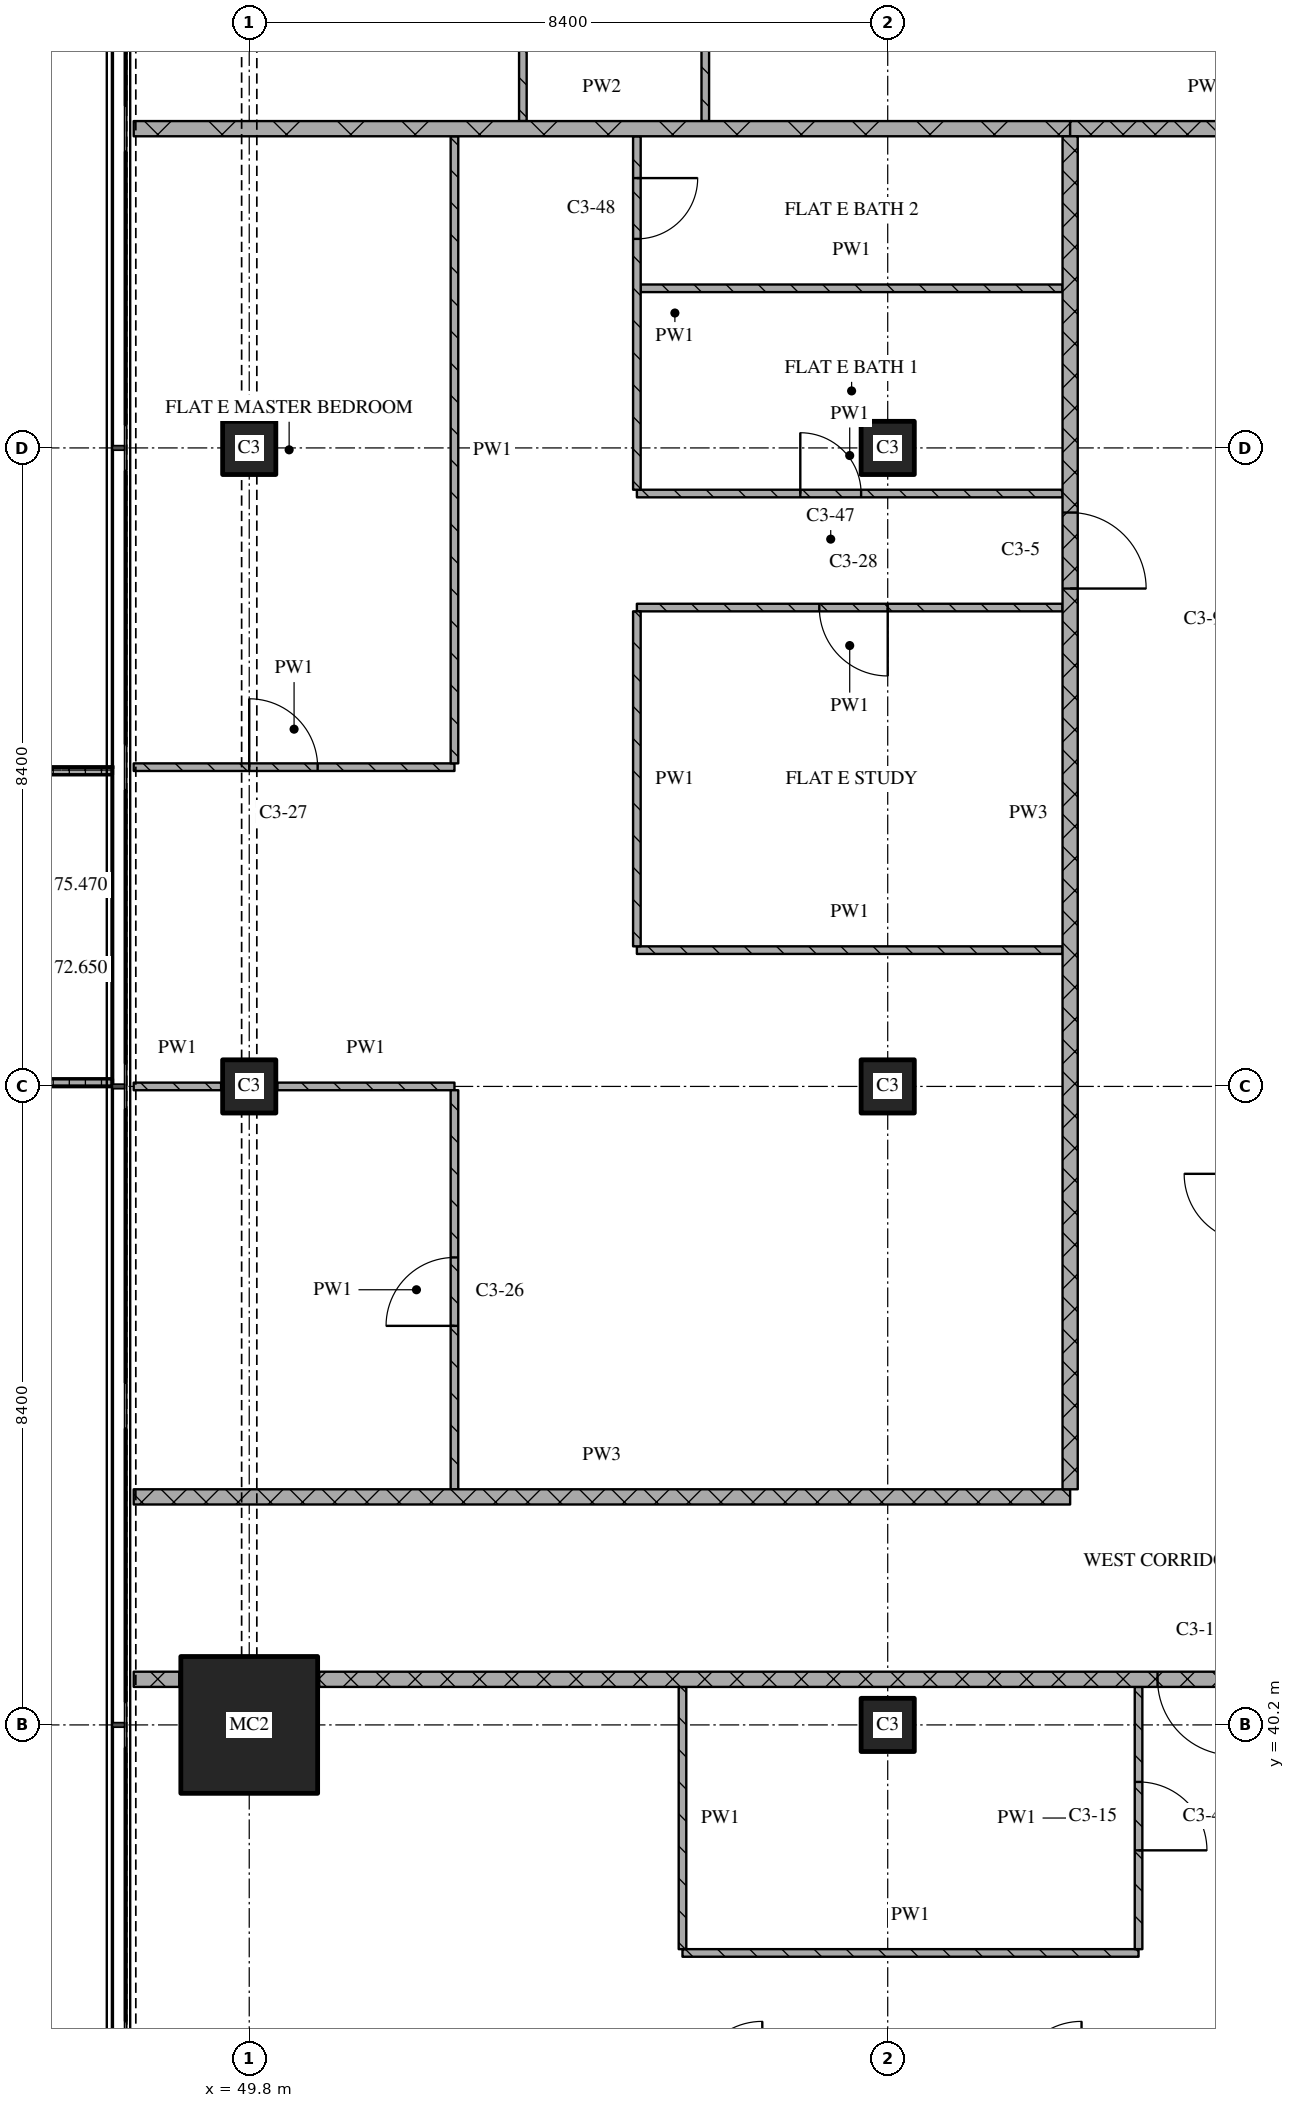
"""IFC4 building model, lengths in metres.
Left out: names, types, materials, properties, quantities, classifications, styles, units other than length and angle.
Written with IfcOpenShell. Run it as: python <this file> out.ifc"""

import sys

from ifc_helpers import new_model, si_unit, direction, frame, frame_2d, origin, origin_2d, place, context, subcontext, project, spatial, polyline, rectangle, outline, extrude, element, fill, save


model = new_model("IFC4")
c1 = context("Model", 3, precision=1e-05, world=origin(), true_north=direction((0.0, 1.0)))
c2 = subcontext(c1, "Body", "Model", "MODEL_VIEW")
j1 = project(units=[si_unit("LENGTHUNIT", "METRE"), si_unit("PLANEANGLEUNIT", "RADIAN")], contexts=[c1])
p1 = place(None, origin())
s1 = spatial("IfcSite", under=j1, at=p1, CompositionType="ELEMENT")
p2 = place(p1, origin())
s2 = spatial("IfcBuilding", under=s1, at=p2, CompositionType="ELEMENT")
p3 = place(p2, frame((0.0, 0.0, 172.65)))
s3 = spatial("IfcBuildingStorey", under=s2, at=p3, CompositionType="ELEMENT", Elevation=172.65)
p4 = place(p3, frame((49.8, 40.2, 0.0), z_axis=(0.0, 0.0, 1.0), x_axis=(1.0, 0.0, 0.0)))
e1 = element("IfcColumn", 1, at=p4, inside=s3, PredefinedType="COLUMN", context=c2, shape_type="SweptSolid", body=[
    extrude(rectangle(XDim=1.8, YDim=1.8, at=origin_2d()), origin(), (0.0, 0.0, 1.0), 3.6),
])
for number, where, z_axis, x_axis in (
    (2, (49.8, 48.6, 0.0), (0.0, 0.0, 1.0), (1.0, 0.0, 0.0)),
    (3, (49.8, 57.0, 0.0), (0.0, 0.0, 1.0), (1.0, 0.0, 0.0)),
    (4, (58.2, 40.2, 0.0), (0.0, 0.0, 1.0), (1.0, 0.0, 0.0)),
    (5, (58.2, 48.6, 0.0), (0.0, 0.0, 1.0), (1.0, 0.0, 0.0)),
    (6, (58.2, 57.0, 0.0), (0.0, 0.0, 1.0), (1.0, 0.0, 0.0)),
):
    element("IfcColumn", number, at=place(p3, frame(where, z_axis=z_axis, x_axis=x_axis)), inside=s3, PredefinedType="COLUMN", context=c2, shape_type="SweptSolid", body=[
        extrude(rectangle(XDim=0.7, YDim=0.7, at=origin_2d()), origin(), (0.0, 0.0, 1.0), 3.6),
    ])
p5 = place(p3, origin())
e7 = element("IfcWall", 7, at=p5, inside=s3, PredefinedType="SOLIDWALL", context=c2, shape_type="SweptSolid", body=[
    extrude(outline(polyline([(48.0, 52.8), (48.0, 52.7), (46.367, 52.7), (46.367, 48.7), (48.0, 48.7), (48.0, 48.6), (46.267, 48.6), (46.267, 52.8), (48.0, 52.8)])), origin(), (0.0, 0.0, 1.0), 1.0),
])
p6 = place(p3, frame((55.5, 37.2, 0.0), z_axis=(0.0, 0.0, 1.0), x_axis=(1.0, 0.0, 0.0)))
e8 = element("IfcWall", 8, at=p6, inside=s3, PredefinedType="PARTITIONING", context=c2, shape_type="SweptSolid", body=[
    extrude(rectangle(XDim=6.0, YDim=0.1, at=frame_2d((3.0, 0.0))), origin(), (0.0, 0.0, 1.0), 3.32),
])
p7 = place(p3, frame((48.28, 40.8, 0.0), z_axis=(0.0, 0.0, 1.0), x_axis=(1.0, 0.0, 0.0)))
e9 = element("IfcWall", 9, at=p7, inside=s3, PredefinedType="PARTITIONING", context=c2, shape_type="SweptSolid", body=[
    extrude(rectangle(XDim=0.6, YDim=0.2, at=frame_2d((0.3, 0.0))), origin(), (0.0, 0.0, 1.0), 3.32),
])
p8 = place(p3, frame((75.0, 40.8, 0.0), z_axis=(0.0, 0.0, 1.0), x_axis=(-1.0, 0.0, 0.0)))
e10 = element("IfcWall", 10, at=p8, inside=s3, PredefinedType="PARTITIONING", context=c2, shape_type="SweptSolid", body=[
    extrude(rectangle(XDim=24.28, YDim=0.2, at=frame_2d((12.14, 0.0))), origin(), (0.0, 0.0, 1.0), 3.32),
])
p9 = place(p8, frame((12.25, 0.0, 0.0)))
e11 = element("IfcOpeningElement", 11, at=p9, cuts=e10, PredefinedType="OPENING", context=c2, shape_type="SweptSolid", body=[
    extrude(rectangle(XDim=1.0, YDim=2.1, at=frame_2d((0.5, 1.05))), frame((0.0, 0.11, 0.0), z_axis=(0.0, -1.0, 0.0), x_axis=(1.0, 0.0, 0.0)), (0.0, 0.0, 1.0), 0.22),
])
p10 = place(p3, frame((48.28, 43.2, 0.0), z_axis=(0.0, 0.0, 1.0), x_axis=(1.0, 0.0, 0.0)))
e12 = element("IfcWall", 12, at=p10, inside=s3, PredefinedType="PARTITIONING", context=c2, shape_type="SweptSolid", body=[
    extrude(rectangle(XDim=12.32, YDim=0.2, at=frame_2d((6.16, 0.0))), origin(), (0.0, 0.0, 1.0), 3.32),
])
p11 = place(p3, frame((48.28, 48.6, 0.0), z_axis=(0.0, 0.0, 1.0), x_axis=(1.0, 0.0, 0.0)))
e13 = element("IfcWall", 13, at=p11, inside=s3, PredefinedType="PARTITIONING", context=c2, shape_type="SweptSolid", body=[
    extrude(rectangle(XDim=1.15, YDim=0.1, at=frame_2d((0.575, 0.0))), origin(), (0.0, 0.0, 1.0), 3.32),
])
p12 = place(p3, frame((50.17, 48.6, 0.0), z_axis=(0.0, 0.0, 1.0), x_axis=(1.0, 0.0, 0.0)))
e14 = element("IfcWall", 14, at=p12, inside=s3, PredefinedType="PARTITIONING", context=c2, shape_type="SweptSolid", body=[
    extrude(rectangle(XDim=2.33, YDim=0.1, at=frame_2d((1.165, 0.0))), origin(), (0.0, 0.0, 1.0), 3.32),
])
p13 = place(p3, frame((54.9, 50.393, 0.0), z_axis=(0.0, 0.0, 1.0), x_axis=(1.0, 0.0, 0.0)))
e15 = element("IfcWall", 15, at=p13, inside=s3, PredefinedType="PARTITIONING", context=c2, shape_type="SweptSolid", body=[
    extrude(rectangle(XDim=5.6, YDim=0.1, at=frame_2d((2.8, 0.0))), origin(), (0.0, 0.0, 1.0), 3.32),
])
p14 = place(p3, frame((48.28, 52.8, 0.0), z_axis=(0.0, 0.0, 1.0), x_axis=(1.0, 0.0, 0.0)))
e16 = element("IfcWall", 16, at=p14, inside=s3, PredefinedType="PARTITIONING", context=c2, shape_type="SweptSolid", body=[
    extrude(rectangle(XDim=4.22, YDim=0.1, at=frame_2d((2.11, 0.0))), origin(), (0.0, 0.0, 1.0), 3.32),
])
p15 = place(p14, frame((1.52, 0.0, 0.0)))
e17 = element("IfcOpeningElement", 17, at=p15, cuts=e16, PredefinedType="OPENING", context=c2, shape_type="SweptSolid", body=[
    extrude(rectangle(XDim=0.9, YDim=2.1, at=frame_2d((0.45, 1.05))), frame((0.0, 0.06, 0.0), z_axis=(0.0, -1.0, 0.0), x_axis=(1.0, 0.0, 0.0)), (0.0, 0.0, 1.0), 0.12),
])
p16 = place(p3, frame((60.5, 54.9, 0.0), z_axis=(0.0, 0.0, 1.0), x_axis=(-1.0, 0.0, 0.0)))
e18 = element("IfcWall", 18, at=p16, inside=s3, PredefinedType="PARTITIONING", context=c2, shape_type="SweptSolid", body=[
    extrude(rectangle(XDim=5.6, YDim=0.1, at=frame_2d((2.8, 0.0))), origin(), (0.0, 0.0, 1.0), 3.32),
])
p17 = place(p16, frame((2.3, 0.0, 0.0)))
e19 = element("IfcOpeningElement", 19, at=p17, cuts=e18, PredefinedType="OPENING", context=c2, shape_type="SweptSolid", body=[
    extrude(rectangle(XDim=0.9, YDim=2.1, at=frame_2d((0.45, 1.05))), frame((0.0, 0.06, 0.0), z_axis=(0.0, -1.0, 0.0), x_axis=(1.0, 0.0, 0.0)), (0.0, 0.0, 1.0), 0.12),
])
p18 = place(p3, frame((54.9, 56.4, 0.0), z_axis=(0.0, 0.0, 1.0), x_axis=(1.0, 0.0, 0.0)))
e20 = element("IfcWall", 20, at=p18, inside=s3, PredefinedType="PARTITIONING", context=c2, shape_type="SweptSolid", body=[
    extrude(rectangle(XDim=5.6, YDim=0.1, at=frame_2d((2.8, 0.0))), origin(), (0.0, 0.0, 1.0), 3.32),
])
p19 = place(p18, frame((2.15, 0.0, 0.0)))
e21 = element("IfcOpeningElement", 21, at=p19, cuts=e20, PredefinedType="OPENING", context=c2, shape_type="SweptSolid", body=[
    extrude(rectangle(XDim=0.8, YDim=2.1, at=frame_2d((0.4, 1.05))), frame((0.0, 0.06, 0.0), z_axis=(0.0, -1.0, 0.0), x_axis=(1.0, 0.0, 0.0)), (0.0, 0.0, 1.0), 0.12),
])
p20 = place(p3, frame((54.95, 59.1, 0.0), z_axis=(0.0, 0.0, 1.0), x_axis=(1.0, 0.0, 0.0)))
e22 = element("IfcWall", 22, at=p20, inside=s3, PredefinedType="PARTITIONING", context=c2, shape_type="SweptSolid", body=[
    extrude(rectangle(XDim=5.55, YDim=0.1, at=frame_2d((2.775, 0.0))), origin(), (0.0, 0.0, 1.0), 3.32),
])
p21 = place(p3, frame((60.6, 61.2, 0.0), z_axis=(0.0, 0.0, 1.0), x_axis=(1.0, 0.0, 0.0)))
e23 = element("IfcWall", 23, at=p21, inside=s3, PredefinedType="PARTITIONING", context=c2, shape_type="SweptSolid", body=[
    extrude(rectangle(XDim=3.6, YDim=0.2, at=frame_2d((1.8, 0.0))), origin(), (0.0, 0.0, 1.0), 3.32),
])
p22 = place(p3, frame((48.28, 61.2, 0.0), z_axis=(0.0, 0.0, 1.0), x_axis=(1.0, 0.0, 0.0)))
e24 = element("IfcWall", 24, at=p22, inside=s3, PredefinedType="PARTITIONING", context=c2, shape_type="SweptSolid", body=[
    extrude(rectangle(XDim=12.32, YDim=0.2, at=frame_2d((6.16, 0.0))), origin(), (0.0, 0.0, 1.0), 3.32),
])
p23 = place(p3, frame((52.5, 43.3, 0.0), z_axis=(0.0, 0.0, 1.0), x_axis=(0.0, 1.0, 0.0)))
e25 = element("IfcWall", 25, at=p23, inside=s3, PredefinedType="PARTITIONING", context=c2, shape_type="SweptSolid", body=[
    extrude(rectangle(XDim=5.25, YDim=0.1, at=frame_2d((2.625, 0.0))), origin(), (0.0, 0.0, 1.0), 3.32),
])
p24 = place(p23, frame((2.15, 0.0, 0.0)))
e26 = element("IfcOpeningElement", 26, at=p24, cuts=e25, PredefinedType="OPENING", context=c2, shape_type="SweptSolid", body=[
    extrude(rectangle(XDim=0.9, YDim=2.1, at=frame_2d((0.45, 1.05))), frame((0.0, 0.06, 0.0), z_axis=(0.0, -1.0, 0.0), x_axis=(1.0, 0.0, 0.0)), (0.0, 0.0, 1.0), 0.12),
])
for number, where, z_axis, x_axis in (
    (27, (52.5, 61.1, 0.0), (0.0, 0.0, 1.0), (0.0, -1.0, 0.0)),
    (28, (53.4, 69.55, 0.0), (0.0, 0.0, 1.0), (0.0, -1.0, 0.0)),
):
    element("IfcWall", number, at=place(p3, frame(where, z_axis=z_axis, x_axis=x_axis)), inside=s3, PredefinedType="PARTITIONING", context=c2, shape_type="SweptSolid", body=[
        extrude(rectangle(XDim=8.25, YDim=0.1, at=frame_2d((4.125, 0.0))), origin(), (0.0, 0.0, 1.0), 3.32),
    ])
p25 = place(p3, frame((54.9, 54.85, 0.0), z_axis=(0.0, 0.0, 1.0), x_axis=(0.0, -1.0, 0.0)))
e29 = element("IfcWall", 29, at=p25, inside=s3, PredefinedType="PARTITIONING", context=c2, shape_type="SweptSolid", body=[
    extrude(rectangle(XDim=4.407, YDim=0.1, at=frame_2d((2.204, 0.0))), origin(), (0.0, 0.0, 1.0), 3.32),
])
p26 = place(p3, frame((54.9, 61.1, 0.0), z_axis=(0.0, 0.0, 1.0), x_axis=(0.0, -1.0, 0.0)))
e30 = element("IfcWall", 30, at=p26, inside=s3, PredefinedType="PARTITIONING", context=c2, shape_type="SweptSolid", body=[
    extrude(rectangle(XDim=4.65, YDim=0.1, at=frame_2d((2.325, 0.0))), origin(), (0.0, 0.0, 1.0), 3.32),
])
p27 = place(p26, frame((0.55, 0.0, 0.0)))
e31 = element("IfcOpeningElement", 31, at=p27, cuts=e30, PredefinedType="OPENING", context=c2, shape_type="SweptSolid", body=[
    extrude(rectangle(XDim=0.8, YDim=2.1, at=frame_2d((0.4, 1.05))), frame((0.0, 0.06, 0.0), z_axis=(0.0, -1.0, 0.0), x_axis=(1.0, 0.0, 0.0)), (0.0, 0.0, 1.0), 0.12),
])
p28 = place(p3, frame((55.5, 40.7, 0.0), z_axis=(0.0, 0.0, 1.0), x_axis=(0.0, -1.0, 0.0)))
e32 = element("IfcWall", 32, at=p28, inside=s3, PredefinedType="PARTITIONING", context=c2, shape_type="SweptSolid", body=[
    extrude(rectangle(XDim=3.45, YDim=0.1, at=frame_2d((1.725, 0.0))), origin(), (0.0, 0.0, 1.0), 3.32),
])
p29 = place(p3, frame((55.8, 65.65, 0.0), z_axis=(0.0, 0.0, 1.0), x_axis=(0.0, -1.0, 0.0)))
e33 = element("IfcWall", 33, at=p29, inside=s3, PredefinedType="PARTITIONING", context=c2, shape_type="SweptSolid", body=[
    extrude(rectangle(XDim=4.35, YDim=0.1, at=frame_2d((2.175, 0.0))), origin(), (0.0, 0.0, 1.0), 3.32),
])
p30 = place(p29, frame((2.473, 0.0, 0.0)))
e34 = element("IfcOpeningElement", 34, at=p30, cuts=e33, PredefinedType="OPENING", context=c2, shape_type="SweptSolid", body=[
    extrude(rectangle(XDim=0.8, YDim=2.1, at=frame_2d((0.4, 1.05))), frame((0.0, 0.06, 0.0), z_axis=(0.0, -1.0, 0.0), x_axis=(1.0, 0.0, 0.0)), (0.0, 0.0, 1.0), 0.12),
])
p31 = place(p3, frame((60.6, 43.3, 0.0), z_axis=(0.0, 0.0, 1.0), x_axis=(0.0, 1.0, 0.0)))
e35 = element("IfcWall", 35, at=p31, inside=s3, PredefinedType="PARTITIONING", context=c2, shape_type="SweptSolid", body=[
    extrude(rectangle(XDim=17.8, YDim=0.2, at=frame_2d((8.9, 0.0))), origin(), (0.0, 0.0, 1.0), 3.32),
])
p32 = place(p31, frame((11.85, 0.0, 0.0)))
e36 = element("IfcOpeningElement", 36, at=p32, cuts=e35, PredefinedType="OPENING", context=c2, shape_type="SweptSolid", body=[
    extrude(rectangle(XDim=1.0, YDim=2.1, at=frame_2d((0.5, 1.05))), frame((0.0, 0.11, 0.0), z_axis=(0.0, -1.0, 0.0), x_axis=(1.0, 0.0, 0.0)), (0.0, 0.0, 1.0), 0.22),
])
p33 = place(p3, frame((61.5, 37.25, 0.0), z_axis=(0.0, 0.0, 1.0), x_axis=(0.0, 1.0, 0.0)))
e37 = element("IfcWall", 37, at=p33, inside=s3, PredefinedType="PARTITIONING", context=c2, shape_type="SweptSolid", body=[
    extrude(rectangle(XDim=3.45, YDim=0.1, at=frame_2d((1.725, 0.0))), origin(), (0.0, 0.0, 1.0), 3.32),
])
p34 = place(p33, frame((1.3, 0.0, 0.0)))
e38 = element("IfcOpeningElement", 38, at=p34, cuts=e37, PredefinedType="OPENING", context=c2, shape_type="SweptSolid", body=[
    extrude(rectangle(XDim=0.9, YDim=2.1, at=frame_2d((0.45, 1.05))), frame((0.0, 0.06, 0.0), z_axis=(0.0, -1.0, 0.0), x_axis=(1.0, 0.0, 0.0)), (0.0, 0.0, 1.0), 0.12),
])
p35 = place(p9, origin())
e39 = element("IfcDoor", 39, at=p35, inside=s3, OperationType="SINGLE_SWING_LEFT", PredefinedType="DOOR", context=c2, shape_type="SweptSolid", body=[
    extrude(rectangle(XDim=1.0, YDim=2.1, at=frame_2d((0.5, 1.05))), frame((0.0, 0.025, 0.0), z_axis=(0.0, -1.0, 0.0), x_axis=(1.0, 0.0, 0.0)), (0.0, 0.0, 1.0), 0.05),
])
fill(e11, e39)
p36 = place(p15, origin())
e40 = element("IfcDoor", 40, at=p36, inside=s3, OperationType="SINGLE_SWING_LEFT", PredefinedType="DOOR", context=c2, shape_type="SweptSolid", body=[
    extrude(rectangle(XDim=0.9, YDim=2.1, at=frame_2d((0.45, 1.05))), frame((0.0, 0.025, 0.0), z_axis=(0.0, -1.0, 0.0), x_axis=(1.0, 0.0, 0.0)), (0.0, 0.0, 1.0), 0.05),
])
fill(e17, e40)
p37 = place(p17, origin())
e41 = element("IfcDoor", 41, at=p37, inside=s3, OperationType="SINGLE_SWING_LEFT", PredefinedType="DOOR", context=c2, shape_type="SweptSolid", body=[
    extrude(rectangle(XDim=0.9, YDim=2.1, at=frame_2d((0.45, 1.05))), frame((0.0, 0.025, 0.0), z_axis=(0.0, -1.0, 0.0), x_axis=(1.0, 0.0, 0.0)), (0.0, 0.0, 1.0), 0.05),
])
fill(e19, e41)
p38 = place(p19, origin())
e42 = element("IfcDoor", 42, at=p38, inside=s3, OperationType="SINGLE_SWING_LEFT", PredefinedType="DOOR", context=c2, shape_type="SweptSolid", body=[
    extrude(rectangle(XDim=0.8, YDim=2.1, at=frame_2d((0.4, 1.05))), frame((0.0, 0.025, 0.0), z_axis=(0.0, -1.0, 0.0), x_axis=(1.0, 0.0, 0.0)), (0.0, 0.0, 1.0), 0.05),
])
fill(e21, e42)
p39 = place(p24, origin())
e43 = element("IfcDoor", 43, at=p39, inside=s3, OperationType="SINGLE_SWING_LEFT", PredefinedType="DOOR", context=c2, shape_type="SweptSolid", body=[
    extrude(rectangle(XDim=0.9, YDim=2.1, at=frame_2d((0.45, 1.05))), frame((0.0, 0.025, 0.0), z_axis=(0.0, -1.0, 0.0), x_axis=(1.0, 0.0, 0.0)), (0.0, 0.0, 1.0), 0.05),
])
fill(e26, e43)
p40 = place(p27, origin())
e44 = element("IfcDoor", 44, at=p40, inside=s3, OperationType="SINGLE_SWING_LEFT", PredefinedType="DOOR", context=c2, shape_type="SweptSolid", body=[
    extrude(rectangle(XDim=0.8, YDim=2.1, at=frame_2d((0.4, 1.05))), frame((0.0, 0.025, 0.0), z_axis=(0.0, -1.0, 0.0), x_axis=(1.0, 0.0, 0.0)), (0.0, 0.0, 1.0), 0.05),
])
fill(e31, e44)
p41 = place(p32, origin())
e45 = element("IfcDoor", 45, at=p41, inside=s3, OperationType="SINGLE_SWING_RIGHT", PredefinedType="DOOR", context=c2, shape_type="SweptSolid", body=[
    extrude(rectangle(XDim=1.0, YDim=2.1, at=frame_2d((0.5, 1.05))), frame((0.0, 0.025, 0.0), z_axis=(0.0, -1.0, 0.0), x_axis=(1.0, 0.0, 0.0)), (0.0, 0.0, 1.0), 0.05),
])
fill(e36, e45)
p42 = place(p34, origin())
e46 = element("IfcDoor", 46, at=p42, inside=s3, OperationType="SINGLE_SWING_RIGHT", PredefinedType="DOOR", context=c2, shape_type="SweptSolid", body=[
    extrude(rectangle(XDim=0.9, YDim=2.1, at=frame_2d((0.45, 1.05))), frame((0.0, 0.025, 0.0), z_axis=(0.0, -1.0, 0.0), x_axis=(1.0, 0.0, 0.0)), (0.0, 0.0, 1.0), 0.05),
])
fill(e38, e46)
save(model, sys.argv[1])
